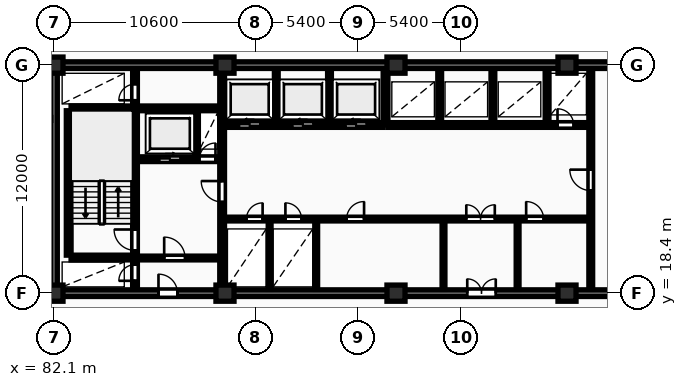
"""IFC4 building model, lengths in metres.
Left out: names, types, materials, properties, quantities, classifications, styles, units other than length and angle.
Written with IfcOpenShell. Run it as: python <this file> out.ifc"""

import sys

from ifc_helpers import new_model, si_unit, direction, frame, frame_2d, origin, origin_2d, place, context, subcontext, project, spatial, rectangle, extrude, element, fill, save


model = new_model("IFC4")
c1 = context("Model", 3, precision=1e-05, world=origin(), true_north=direction((0.0, 1.0)))
c2 = subcontext(c1, "Body", "Model", "MODEL_VIEW")
j1 = project(units=[si_unit("LENGTHUNIT", "METRE"), si_unit("PLANEANGLEUNIT", "RADIAN")], contexts=[c1])
p1 = place(None, origin())
s1 = spatial("IfcSite", under=j1, at=p1, CompositionType="ELEMENT")
p2 = place(p1, origin())
s2 = spatial("IfcBuilding", under=s1, at=p2, CompositionType="ELEMENT")
p3 = place(p2, frame((0.0, 0.0, 24.0)))
s3 = spatial("IfcBuildingStorey", under=s2, at=p3, CompositionType="ELEMENT", Elevation=24.0)
for number, where, z_axis, x_axis in (
    (1, (82.1, 18.4, 0.0), (0.0, 0.0, 1.0), (1.0, 0.0, 0.0)),
    (2, (82.1, 30.4, 0.0), (0.0, 0.0, 1.0), (1.0, 0.0, 0.0)),
    (3, (91.1, 18.4, 0.0), (0.0, 0.0, 1.0), (1.0, 0.0, 0.0)),
    (4, (91.1, 30.4, 0.0), (0.0, 0.0, 1.0), (1.0, 0.0, 0.0)),
    (5, (100.1, 18.4, 0.0), (0.0, 0.0, 1.0), (1.0, 0.0, 0.0)),
    (6, (100.1, 30.4, 0.0), (0.0, 0.0, 1.0), (1.0, 0.0, 0.0)),
    (7, (109.1, 18.4, 0.0), (0.0, 0.0, 1.0), (1.0, 0.0, 0.0)),
    (8, (109.1, 30.4, 0.0), (0.0, 0.0, 1.0), (1.0, 0.0, 0.0)),
):
    element("IfcColumn", number, at=place(p3, frame(where, z_axis=z_axis, x_axis=x_axis)), inside=s3, PredefinedType="COLUMN", context=c2, shape_type="SweptSolid", body=[
        extrude(rectangle(XDim=0.95, YDim=0.85, at=origin_2d()), origin(), (0.0, 0.0, 1.0), 3.25),
    ])
p4 = place(p3, frame((81.925, 30.4, 0.0), z_axis=(0.0, 0.0, 1.0), x_axis=(1.0, 0.0, 0.0)))
e9 = element("IfcWall", 9, at=p4, inside=s3, PredefinedType="SHEAR", context=c2, shape_type="SweptSolid", body=[
    extrude(rectangle(XDim=36.265, YDim=0.35, at=frame_2d((18.132, 0.0))), origin(), (0.0, 0.0, 1.0), 3.25),
])
p5 = place(p3, frame((82.1, 18.575, 0.0), z_axis=(0.0, 0.0, 1.0), x_axis=(0.0, 1.0, 0.0)))
e10 = element("IfcWall", 10, at=p5, inside=s3, PredefinedType="SHEAR", context=c2, shape_type="SweptSolid", body=[
    extrude(rectangle(XDim=11.65, YDim=0.35, at=frame_2d((5.825, 0.0))), origin(), (0.0, 0.0, 1.0), 3.25),
])
p6 = place(p3, frame((81.925, 18.4, 0.0), z_axis=(0.0, 0.0, 1.0), x_axis=(1.0, 0.0, 0.0)))
e11 = element("IfcWall", 11, at=p6, inside=s3, PredefinedType="SHEAR", context=c2, shape_type="SweptSolid", body=[
    extrude(rectangle(XDim=36.265, YDim=0.35, at=frame_2d((18.132, 0.0))), origin(), (0.0, 0.0, 1.0), 3.25),
])
p7 = place(p6, frame((5.675, 0.0, 0.0)))
e12 = element("IfcOpeningElement", 12, at=p7, cuts=e11, PredefinedType="OPENING", context=c2, shape_type="SweptSolid", body=[
    extrude(rectangle(XDim=1.0, YDim=2.15, at=frame_2d((0.5, 1.075))), frame((0.0, 0.185, 0.0), z_axis=(0.0, -1.0, 0.0), x_axis=(1.0, 0.0, 0.0)), (0.0, 0.0, 1.0), 0.37),
])
p8 = place(p6, frame((21.925, 0.0, 0.0)))
e13 = element("IfcOpeningElement", 13, at=p8, cuts=e11, PredefinedType="OPENING", context=c2, shape_type="SweptSolid", body=[
    extrude(rectangle(XDim=1.5, YDim=2.2, at=frame_2d((0.75, 1.1))), frame((0.0, 0.185, 0.0), z_axis=(0.0, -1.0, 0.0), x_axis=(1.0, 0.0, 0.0)), (0.0, 0.0, 1.0), 0.37),
])
p9 = place(p6, frame((29.875, 0.0, 0.0)))
e14 = element("IfcOpeningElement", 14, at=p9, cuts=e11, PredefinedType="OPENING", context=c2, shape_type="SweptSolid", body=[
    extrude(rectangle(XDim=1.0, YDim=2.15, at=frame_2d((0.5, 1.075))), frame((0.0, 0.185, 0.0), z_axis=(0.0, -1.0, 0.0), x_axis=(1.0, 0.0, 0.0)), (0.0, 0.0, 1.0), 0.37),
])
p10 = place(p3, frame((82.875, 20.4, 0.0), z_axis=(0.0, 0.0, 1.0), x_axis=(0.0, 1.0, 0.0)))
e15 = element("IfcWall", 15, at=p10, inside=s3, PredefinedType="SHEAR", context=c2, shape_type="SweptSolid", body=[
    extrude(rectangle(XDim=7.6, YDim=0.25, at=frame_2d((3.8, 0.0))), origin(), (0.0, 0.0, 1.0), 3.25),
])
p11 = place(p3, frame((86.365, 18.6, 0.0), z_axis=(0.0, 0.0, 1.0), x_axis=(0.0, 1.0, 0.0)))
e16 = element("IfcWall", 16, at=p11, inside=s3, PredefinedType="SHEAR", context=c2, shape_type="SweptSolid", body=[
    extrude(rectangle(XDim=11.6, YDim=0.25, at=frame_2d((5.8, 0.0))), origin(), (0.0, 0.0, 1.0), 3.25),
])
p12 = place(p11, frame((0.45, 0.0, 0.0)))
e17 = element("IfcOpeningElement", 17, at=p12, cuts=e16, PredefinedType="OPENING", context=c2, shape_type="SweptSolid", body=[
    extrude(rectangle(XDim=0.85, YDim=2.05, at=frame_2d((0.425, 1.025))), frame((0.0, 0.135, 0.0), z_axis=(0.0, -1.0, 0.0), x_axis=(1.0, 0.0, 0.0)), (0.0, 0.0, 1.0), 0.27),
])
p13 = place(p11, frame((2.05, 0.0, 0.0)))
e18 = element("IfcOpeningElement", 18, at=p13, cuts=e16, PredefinedType="OPENING", context=c2, shape_type="SweptSolid", body=[
    extrude(rectangle(XDim=1.1, YDim=2.1, at=frame_2d((0.55, 1.05))), frame((0.0, 0.135, 0.0), z_axis=(0.0, -1.0, 0.0), x_axis=(1.0, 0.0, 0.0)), (0.0, 0.0, 1.0), 0.27),
])
p14 = place(p11, frame((9.95, 0.0, 0.0)))
e19 = element("IfcOpeningElement", 19, at=p14, cuts=e16, PredefinedType="OPENING", context=c2, shape_type="SweptSolid", body=[
    extrude(rectangle(XDim=0.85, YDim=2.05, at=frame_2d((0.425, 1.025))), frame((0.0, 0.135, 0.0), z_axis=(0.0, -1.0, 0.0), x_axis=(1.0, 0.0, 0.0)), (0.0, 0.0, 1.0), 0.27),
])
p15 = place(p3, frame((83.0, 20.275, 0.0), z_axis=(0.0, 0.0, 1.0), x_axis=(1.0, 0.0, 0.0)))
e20 = element("IfcWall", 20, at=p15, inside=s3, PredefinedType="SHEAR", context=c2, shape_type="SweptSolid", body=[
    extrude(rectangle(XDim=3.24, YDim=0.25, at=frame_2d((1.62, 0.0))), origin(), (0.0, 0.0, 1.0), 3.25),
])
p16 = place(p3, frame((83.0, 28.125, 0.0), z_axis=(0.0, 0.0, 1.0), x_axis=(1.0, 0.0, 0.0)))
e21 = element("IfcWall", 21, at=p16, inside=s3, PredefinedType="SHEAR", context=c2, shape_type="SweptSolid", body=[
    extrude(rectangle(XDim=7.82, YDim=0.25, at=frame_2d((3.91, 0.0))), origin(), (0.0, 0.0, 1.0), 3.25),
])
p17 = place(p3, frame((86.5, 25.45, 0.0), z_axis=(0.0, 0.0, 1.0), x_axis=(1.0, 0.0, 0.0)))
e22 = element("IfcWall", 22, at=p17, inside=s3, PredefinedType="SHEAR", context=c2, shape_type="SweptSolid", body=[
    extrude(rectangle(XDim=4.32, YDim=0.25, at=frame_2d((2.16, 0.0))), origin(), (0.0, 0.0, 1.0), 3.25),
])
p18 = place(p17, frame((1.14, 0.0, 0.0)))
e23 = element("IfcOpeningElement", 23, at=p18, cuts=e22, PredefinedType="OPENING", context=c2, shape_type="SweptSolid", body=[
    extrude(rectangle(XDim=1.12, YDim=2.12, at=frame_2d((0.56, 1.06))), frame((0.0, 0.135, 0.0), z_axis=(0.0, -1.0, 0.0), x_axis=(1.0, 0.0, 0.0)), (0.0, 0.0, 1.0), 0.27),
])
p19 = place(p17, frame((3.25, 0.0, 0.0)))
e24 = element("IfcOpeningElement", 24, at=p19, cuts=e22, PredefinedType="OPENING", context=c2, shape_type="SweptSolid", body=[
    extrude(rectangle(XDim=0.85, YDim=2.05, at=frame_2d((0.425, 1.025))), frame((0.0, 0.135, 0.0), z_axis=(0.0, -1.0, 0.0), x_axis=(1.0, 0.0, 0.0)), (0.0, 0.0, 1.0), 0.27),
])
p20 = place(p3, frame((89.6, 25.58, 0.0), z_axis=(0.0, 0.0, 1.0), x_axis=(0.0, 1.0, 0.0)))
e25 = element("IfcWall", 25, at=p20, inside=s3, PredefinedType="PARTITIONING", context=c2, shape_type="SweptSolid", body=[
    extrude(rectangle(XDim=2.42, YDim=0.2, at=frame_2d((1.21, 0.0))), origin(), (0.0, 0.0, 1.0), 2.97),
])
p21 = place(p3, frame((86.5, 20.25, 0.0), z_axis=(0.0, 0.0, 1.0), x_axis=(1.0, 0.0, 0.0)))
e26 = element("IfcWall", 26, at=p21, inside=s3, PredefinedType="PARTITIONING", context=c2, shape_type="SweptSolid", body=[
    extrude(rectangle(XDim=4.32, YDim=0.2, at=frame_2d((2.16, 0.0))), origin(), (0.0, 0.0, 1.0), 2.97),
])
p22 = place(p21, frame((1.4, 0.0, 0.0)))
e27 = element("IfcOpeningElement", 27, at=p22, cuts=e26, PredefinedType="OPENING", context=c2, shape_type="SweptSolid", body=[
    extrude(rectangle(XDim=1.1, YDim=2.1, at=frame_2d((0.55, 1.05))), frame((0.0, 0.11, 0.0), z_axis=(0.0, -1.0, 0.0), x_axis=(1.0, 0.0, 0.0)), (0.0, 0.0, 1.0), 0.22),
])
p23 = place(p3, frame((90.95, 18.6, 0.0), z_axis=(0.0, 0.0, 1.0), x_axis=(0.0, 1.0, 0.0)))
e28 = element("IfcWall", 28, at=p23, inside=s3, PredefinedType="SHEAR", context=c2, shape_type="SweptSolid", body=[
    extrude(rectangle(XDim=11.6, YDim=0.25, at=frame_2d((5.8, 0.0))), origin(), (0.0, 0.0, 1.0), 3.25),
])
p24 = place(p23, frame((4.6, 0.0, 0.0)))
e29 = element("IfcOpeningElement", 29, at=p24, cuts=e28, PredefinedType="OPENING", context=c2, shape_type="SweptSolid", body=[
    extrude(rectangle(XDim=1.1, YDim=2.1, at=frame_2d((0.55, 1.05))), frame((0.0, 0.135, 0.0), z_axis=(0.0, -1.0, 0.0), x_axis=(1.0, 0.0, 0.0)), (0.0, 0.0, 1.0), 0.27),
])
for number, where, z_axis, x_axis in (
    (30, (93.8, 27.38, 0.0), (0.0, 0.0, 1.0), (0.0, 1.0, 0.0)),
    (31, (96.6, 27.38, 0.0), (0.0, 0.0, 1.0), (0.0, 1.0, 0.0)),
):
    element("IfcWall", number, at=place(p3, frame(where, z_axis=z_axis, x_axis=x_axis)), inside=s3, PredefinedType="PARTITIONING", context=c2, shape_type="SweptSolid", body=[
        extrude(rectangle(XDim=2.82, YDim=0.2, at=frame_2d((1.41, 0.0))), origin(), (0.0, 0.0, 1.0), 2.97),
    ])
p25 = place(p3, frame((91.08, 27.25, 0.0), z_axis=(0.0, 0.0, 1.0), x_axis=(1.0, 0.0, 0.0)))
e32 = element("IfcWall", 32, at=p25, inside=s3, PredefinedType="SHEAR", context=c2, shape_type="SweptSolid", body=[
    extrude(rectangle(XDim=8.34, YDim=0.25, at=frame_2d((4.17, 0.0))), origin(), (0.0, 0.0, 1.0), 3.25),
])
p26 = place(p25, frame((0.76, 0.0, 0.0)))
e33 = element("IfcOpeningElement", 33, at=p26, cuts=e32, PredefinedType="OPENING", context=c2, shape_type="SweptSolid", body=[
    extrude(rectangle(XDim=1.12, YDim=2.12, at=frame_2d((0.56, 1.06))), frame((0.0, 0.135, 0.0), z_axis=(0.0, -1.0, 0.0), x_axis=(1.0, 0.0, 0.0)), (0.0, 0.0, 1.0), 0.27),
])
p27 = place(p25, frame((3.56, 0.0, 0.0)))
e34 = element("IfcOpeningElement", 34, at=p27, cuts=e32, PredefinedType="OPENING", context=c2, shape_type="SweptSolid", body=[
    extrude(rectangle(XDim=1.12, YDim=2.12, at=frame_2d((0.56, 1.06))), frame((0.0, 0.135, 0.0), z_axis=(0.0, -1.0, 0.0), x_axis=(1.0, 0.0, 0.0)), (0.0, 0.0, 1.0), 0.27),
])
p28 = place(p25, frame((6.36, 0.0, 0.0)))
e35 = element("IfcOpeningElement", 35, at=p28, cuts=e32, PredefinedType="OPENING", context=c2, shape_type="SweptSolid", body=[
    extrude(rectangle(XDim=1.12, YDim=2.12, at=frame_2d((0.56, 1.06))), frame((0.0, 0.135, 0.0), z_axis=(0.0, -1.0, 0.0), x_axis=(1.0, 0.0, 0.0)), (0.0, 0.0, 1.0), 0.27),
])
p29 = place(p3, frame((99.55, 27.25, 0.0), z_axis=(0.0, 0.0, 1.0), x_axis=(0.0, 1.0, 0.0)))
e36 = element("IfcWall", 36, at=p29, inside=s3, PredefinedType="SHEAR", context=c2, shape_type="SweptSolid", body=[
    extrude(rectangle(XDim=2.95, YDim=0.25, at=frame_2d((1.475, 0.0))), origin(), (0.0, 0.0, 1.0), 3.25),
])
for number, where, z_axis, x_axis in (
    (37, (102.4, 27.38, 0.0), (0.0, 0.0, 1.0), (0.0, 1.0, 0.0)),
    (38, (105.2, 27.38, 0.0), (0.0, 0.0, 1.0), (0.0, 1.0, 0.0)),
    (39, (108.05, 27.38, 0.0), (0.0, 0.0, 1.0), (0.0, 1.0, 0.0)),
):
    element("IfcWall", number, at=place(p3, frame(where, z_axis=z_axis, x_axis=x_axis)), inside=s3, PredefinedType="PARTITIONING", context=c2, shape_type="SweptSolid", body=[
        extrude(rectangle(XDim=2.82, YDim=0.2, at=frame_2d((1.41, 0.0))), origin(), (0.0, 0.0, 1.0), 2.97),
    ])
p30 = place(p3, frame((99.68, 27.25, 0.0), z_axis=(0.0, 0.0, 1.0), x_axis=(1.0, 0.0, 0.0)))
e40 = element("IfcWall", 40, at=p30, inside=s3, PredefinedType="SHEAR", context=c2, shape_type="SweptSolid", body=[
    extrude(rectangle(XDim=10.54, YDim=0.25, at=frame_2d((5.27, 0.0))), origin(), (0.0, 0.0, 1.0), 3.25),
])
p31 = place(p30, frame((8.92, 0.0, 0.0)))
e41 = element("IfcOpeningElement", 41, at=p31, cuts=e40, PredefinedType="OPENING", context=c2, shape_type="SweptSolid", body=[
    extrude(rectangle(XDim=0.85, YDim=2.05, at=frame_2d((0.425, 1.025))), frame((0.0, 0.135, 0.0), z_axis=(0.0, -1.0, 0.0), x_axis=(1.0, 0.0, 0.0)), (0.0, 0.0, 1.0), 0.27),
])
for number, where, z_axis, x_axis in (
    (42, (93.45, 18.6, 0.0), (0.0, 0.0, 1.0), (0.0, 1.0, 0.0)),
    (43, (95.9, 18.6, 0.0), (0.0, 0.0, 1.0), (0.0, 1.0, 0.0)),
    (44, (102.6, 18.6, 0.0), (0.0, 0.0, 1.0), (0.0, 1.0, 0.0)),
    (45, (106.5, 18.6, 0.0), (0.0, 0.0, 1.0), (0.0, 1.0, 0.0)),
):
    element("IfcWall", number, at=place(p3, frame(where, z_axis=z_axis, x_axis=x_axis)), inside=s3, PredefinedType="PARTITIONING", context=c2, shape_type="SweptSolid", body=[
        extrude(rectangle(XDim=3.6, YDim=0.15, at=frame_2d((1.8, 0.0))), origin(), (0.0, 0.0, 1.0), 2.97),
    ])
p32 = place(p3, frame((91.08, 22.3, 0.0), z_axis=(0.0, 0.0, 1.0), x_axis=(1.0, 0.0, 0.0)))
e46 = element("IfcWall", 46, at=p32, inside=s3, PredefinedType="PARTITIONING", context=c2, shape_type="SweptSolid", body=[
    extrude(rectangle(XDim=19.14, YDim=0.2, at=frame_2d((9.57, 0.0))), origin(), (0.0, 0.0, 1.0), 2.97),
])
p33 = place(p32, frame((1.15, 0.0, 0.0)))
e47 = element("IfcOpeningElement", 47, at=p33, cuts=e46, PredefinedType="OPENING", context=c2, shape_type="SweptSolid", body=[
    extrude(rectangle(XDim=0.85, YDim=2.05, at=frame_2d((0.425, 1.025))), frame((0.0, 0.11, 0.0), z_axis=(0.0, -1.0, 0.0), x_axis=(1.0, 0.0, 0.0)), (0.0, 0.0, 1.0), 0.22),
])
p34 = place(p32, frame((3.2, 0.0, 0.0)))
e48 = element("IfcOpeningElement", 48, at=p34, cuts=e46, PredefinedType="OPENING", context=c2, shape_type="SweptSolid", body=[
    extrude(rectangle(XDim=0.85, YDim=2.05, at=frame_2d((0.425, 1.025))), frame((0.0, 0.11, 0.0), z_axis=(0.0, -1.0, 0.0), x_axis=(1.0, 0.0, 0.0)), (0.0, 0.0, 1.0), 0.22),
])
p35 = place(p32, frame((12.72, 0.0, 0.0)))
e49 = element("IfcOpeningElement", 49, at=p35, cuts=e46, PredefinedType="OPENING", context=c2, shape_type="SweptSolid", body=[
    extrude(rectangle(XDim=1.5, YDim=2.2, at=frame_2d((0.75, 1.1))), frame((0.0, 0.11, 0.0), z_axis=(0.0, -1.0, 0.0), x_axis=(1.0, 0.0, 0.0)), (0.0, 0.0, 1.0), 0.22),
])
p36 = place(p32, frame((6.42, 0.0, 0.0)))
e50 = element("IfcOpeningElement", 50, at=p36, cuts=e46, PredefinedType="OPENING", context=c2, shape_type="SweptSolid", body=[
    extrude(rectangle(XDim=0.92, YDim=2.08, at=frame_2d((0.46, 1.04))), frame((0.0, 0.11, 0.0), z_axis=(0.0, -1.0, 0.0), x_axis=(1.0, 0.0, 0.0)), (0.0, 0.0, 1.0), 0.22),
])
p37 = place(p32, frame((15.87, 0.0, 0.0)))
e51 = element("IfcOpeningElement", 51, at=p37, cuts=e46, PredefinedType="OPENING", context=c2, shape_type="SweptSolid", body=[
    extrude(rectangle(XDim=0.92, YDim=2.08, at=frame_2d((0.46, 1.04))), frame((0.0, 0.11, 0.0), z_axis=(0.0, -1.0, 0.0), x_axis=(1.0, 0.0, 0.0)), (0.0, 0.0, 1.0), 0.22),
])
p38 = place(p3, frame((110.35, 18.6, 0.0), z_axis=(0.0, 0.0, 1.0), x_axis=(0.0, 1.0, 0.0)))
e52 = element("IfcWall", 52, at=p38, inside=s3, PredefinedType="PARTITIONING", context=c2, shape_type="SweptSolid", body=[
    extrude(rectangle(XDim=11.6, YDim=0.2, at=frame_2d((5.8, 0.0))), origin(), (0.0, 0.0, 1.0), 2.97),
])
p39 = place(p38, frame((5.2, 0.0, 0.0)))
e53 = element("IfcOpeningElement", 53, at=p39, cuts=e52, PredefinedType="OPENING", context=c2, shape_type="SweptSolid", body=[
    extrude(rectangle(XDim=1.1, YDim=2.15, at=frame_2d((0.55, 1.075))), frame((0.0, 0.11, 0.0), z_axis=(0.0, -1.0, 0.0), x_axis=(1.0, 0.0, 0.0)), (0.0, 0.0, 1.0), 0.22),
])
p40 = place(p7, origin())
e54 = element("IfcDoor", 54, at=p40, inside=s3, OperationType="SINGLE_SWING_LEFT", PredefinedType="DOOR", context=c2, shape_type="SweptSolid", body=[
    extrude(rectangle(XDim=1.0, YDim=2.15, at=frame_2d((0.5, 1.075))), frame((0.0, 0.025, 0.0), z_axis=(0.0, -1.0, 0.0), x_axis=(1.0, 0.0, 0.0)), (0.0, 0.0, 1.0), 0.05),
])
fill(e12, e54)
p41 = place(p8, origin())
e55 = element("IfcDoor", 55, at=p41, inside=s3, OperationType="DOUBLE_DOOR_SINGLE_SWING", PredefinedType="DOOR", context=c2, shape_type="SweptSolid", body=[
    extrude(rectangle(XDim=1.5, YDim=2.2, at=frame_2d((0.75, 1.1))), frame((0.0, 0.025, 0.0), z_axis=(0.0, -1.0, 0.0), x_axis=(1.0, 0.0, 0.0)), (0.0, 0.0, 1.0), 0.05),
])
fill(e13, e55)
p42 = place(p12, origin())
e56 = element("IfcDoor", 56, at=p42, inside=s3, OperationType="SINGLE_SWING_LEFT", PredefinedType="DOOR", context=c2, shape_type="SweptSolid", body=[
    extrude(rectangle(XDim=0.85, YDim=2.05, at=frame_2d((0.425, 1.025))), frame((0.0, 0.025, 0.0), z_axis=(0.0, -1.0, 0.0), x_axis=(1.0, 0.0, 0.0)), (0.0, 0.0, 1.0), 0.05),
])
fill(e17, e56)
p43 = place(p13, origin())
e57 = element("IfcDoor", 57, at=p43, inside=s3, OperationType="SINGLE_SWING_RIGHT", PredefinedType="DOOR", context=c2, shape_type="SweptSolid", body=[
    extrude(rectangle(XDim=1.1, YDim=2.1, at=frame_2d((0.55, 1.05))), frame((0.0, 0.025, 0.0), z_axis=(0.0, -1.0, 0.0), x_axis=(1.0, 0.0, 0.0)), (0.0, 0.0, 1.0), 0.05),
])
fill(e18, e57)
p44 = place(p14, origin())
e58 = element("IfcDoor", 58, at=p44, inside=s3, OperationType="SINGLE_SWING_LEFT", PredefinedType="DOOR", context=c2, shape_type="SweptSolid", body=[
    extrude(rectangle(XDim=0.85, YDim=2.05, at=frame_2d((0.425, 1.025))), frame((0.0, 0.025, 0.0), z_axis=(0.0, -1.0, 0.0), x_axis=(1.0, 0.0, 0.0)), (0.0, 0.0, 1.0), 0.05),
])
fill(e19, e58)
p45 = place(p18, origin())
e59 = element("IfcDoor", 59, at=p45, inside=s3, OperationType="SLIDING_TO_RIGHT", PredefinedType="DOOR", context=c2, shape_type="SweptSolid", body=[
    extrude(rectangle(XDim=1.12, YDim=2.12, at=frame_2d((0.56, 1.06))), frame((0.0, 0.025, 0.0), z_axis=(0.0, -1.0, 0.0), x_axis=(1.0, 0.0, 0.0)), (0.0, 0.0, 1.0), 0.05),
])
fill(e23, e59)
p46 = place(p19, origin())
e60 = element("IfcDoor", 60, at=p46, inside=s3, OperationType="SINGLE_SWING_RIGHT", PredefinedType="DOOR", context=c2, shape_type="SweptSolid", body=[
    extrude(rectangle(XDim=0.85, YDim=2.05, at=frame_2d((0.425, 1.025))), frame((0.0, 0.025, 0.0), z_axis=(0.0, -1.0, 0.0), x_axis=(1.0, 0.0, 0.0)), (0.0, 0.0, 1.0), 0.05),
])
fill(e24, e60)
p47 = place(p22, origin())
e61 = element("IfcDoor", 61, at=p47, inside=s3, OperationType="SINGLE_SWING_LEFT", PredefinedType="DOOR", context=c2, shape_type="SweptSolid", body=[
    extrude(rectangle(XDim=1.1, YDim=2.1, at=frame_2d((0.55, 1.05))), frame((0.0, 0.025, 0.0), z_axis=(0.0, -1.0, 0.0), x_axis=(1.0, 0.0, 0.0)), (0.0, 0.0, 1.0), 0.05),
])
fill(e27, e61)
p48 = place(p24, origin())
e62 = element("IfcDoor", 62, at=p48, inside=s3, OperationType="SINGLE_SWING_RIGHT", PredefinedType="DOOR", context=c2, shape_type="SweptSolid", body=[
    extrude(rectangle(XDim=1.1, YDim=2.1, at=frame_2d((0.55, 1.05))), frame((0.0, 0.025, 0.0), z_axis=(0.0, -1.0, 0.0), x_axis=(1.0, 0.0, 0.0)), (0.0, 0.0, 1.0), 0.05),
])
fill(e29, e62)
p49 = place(p26, origin())
e63 = element("IfcDoor", 63, at=p49, inside=s3, OperationType="SLIDING_TO_LEFT", PredefinedType="DOOR", context=c2, shape_type="SweptSolid", body=[
    extrude(rectangle(XDim=1.12, YDim=2.12, at=frame_2d((0.56, 1.06))), frame((0.0, 0.025, 0.0), z_axis=(0.0, -1.0, 0.0), x_axis=(1.0, 0.0, 0.0)), (0.0, 0.0, 1.0), 0.05),
])
fill(e33, e63)
p50 = place(p27, origin())
e64 = element("IfcDoor", 64, at=p50, inside=s3, OperationType="SLIDING_TO_LEFT", PredefinedType="DOOR", context=c2, shape_type="SweptSolid", body=[
    extrude(rectangle(XDim=1.12, YDim=2.12, at=frame_2d((0.56, 1.06))), frame((0.0, 0.025, 0.0), z_axis=(0.0, -1.0, 0.0), x_axis=(1.0, 0.0, 0.0)), (0.0, 0.0, 1.0), 0.05),
])
fill(e34, e64)
p51 = place(p28, origin())
e65 = element("IfcDoor", 65, at=p51, inside=s3, OperationType="SLIDING_TO_LEFT", PredefinedType="DOOR", context=c2, shape_type="SweptSolid", body=[
    extrude(rectangle(XDim=1.12, YDim=2.12, at=frame_2d((0.56, 1.06))), frame((0.0, 0.025, 0.0), z_axis=(0.0, -1.0, 0.0), x_axis=(1.0, 0.0, 0.0)), (0.0, 0.0, 1.0), 0.05),
])
fill(e35, e65)
p52 = place(p31, origin())
e66 = element("IfcDoor", 66, at=p52, inside=s3, OperationType="SINGLE_SWING_LEFT", PredefinedType="DOOR", context=c2, shape_type="SweptSolid", body=[
    extrude(rectangle(XDim=0.85, YDim=2.05, at=frame_2d((0.425, 1.025))), frame((0.0, 0.025, 0.0), z_axis=(0.0, -1.0, 0.0), x_axis=(1.0, 0.0, 0.0)), (0.0, 0.0, 1.0), 0.05),
])
fill(e41, e66)
p53 = place(p33, origin())
e67 = element("IfcDoor", 67, at=p53, inside=s3, OperationType="SINGLE_SWING_RIGHT", PredefinedType="DOOR", context=c2, shape_type="SweptSolid", body=[
    extrude(rectangle(XDim=0.85, YDim=2.05, at=frame_2d((0.425, 1.025))), frame((0.0, 0.025, 0.0), z_axis=(0.0, -1.0, 0.0), x_axis=(1.0, 0.0, 0.0)), (0.0, 0.0, 1.0), 0.05),
])
fill(e47, e67)
p54 = place(p34, origin())
e68 = element("IfcDoor", 68, at=p54, inside=s3, OperationType="SINGLE_SWING_LEFT", PredefinedType="DOOR", context=c2, shape_type="SweptSolid", body=[
    extrude(rectangle(XDim=0.85, YDim=2.05, at=frame_2d((0.425, 1.025))), frame((0.0, 0.025, 0.0), z_axis=(0.0, -1.0, 0.0), x_axis=(1.0, 0.0, 0.0)), (0.0, 0.0, 1.0), 0.05),
])
fill(e48, e68)
p55 = place(p35, origin())
e69 = element("IfcDoor", 69, at=p55, inside=s3, OperationType="DOUBLE_DOOR_SINGLE_SWING", PredefinedType="DOOR", context=c2, shape_type="SweptSolid", body=[
    extrude(rectangle(XDim=1.5, YDim=2.2, at=frame_2d((0.75, 1.1))), frame((0.0, 0.025, 0.0), z_axis=(0.0, -1.0, 0.0), x_axis=(1.0, 0.0, 0.0)), (0.0, 0.0, 1.0), 0.05),
])
fill(e49, e69)
p56 = place(p36, origin())
e70 = element("IfcDoor", 70, at=p56, inside=s3, OperationType="SINGLE_SWING_RIGHT", PredefinedType="DOOR", context=c2, shape_type="SweptSolid", body=[
    extrude(rectangle(XDim=0.92, YDim=2.08, at=frame_2d((0.46, 1.04))), frame((0.0, 0.025, 0.0), z_axis=(0.0, -1.0, 0.0), x_axis=(1.0, 0.0, 0.0)), (0.0, 0.0, 1.0), 0.05),
])
fill(e50, e70)
p57 = place(p37, origin())
e71 = element("IfcDoor", 71, at=p57, inside=s3, OperationType="SINGLE_SWING_LEFT", PredefinedType="DOOR", context=c2, shape_type="SweptSolid", body=[
    extrude(rectangle(XDim=0.92, YDim=2.08, at=frame_2d((0.46, 1.04))), frame((0.0, 0.025, 0.0), z_axis=(0.0, -1.0, 0.0), x_axis=(1.0, 0.0, 0.0)), (0.0, 0.0, 1.0), 0.05),
])
fill(e51, e71)
p58 = place(p39, origin())
e72 = element("IfcDoor", 72, at=p58, inside=s3, OperationType="SINGLE_SWING_RIGHT", PredefinedType="DOOR", context=c2, shape_type="SweptSolid", body=[
    extrude(rectangle(XDim=1.1, YDim=2.15, at=frame_2d((0.55, 1.075))), frame((0.0, 0.025, 0.0), z_axis=(0.0, -1.0, 0.0), x_axis=(1.0, 0.0, 0.0)), (0.0, 0.0, 1.0), 0.05),
])
fill(e53, e72)
save(model, sys.argv[1])
